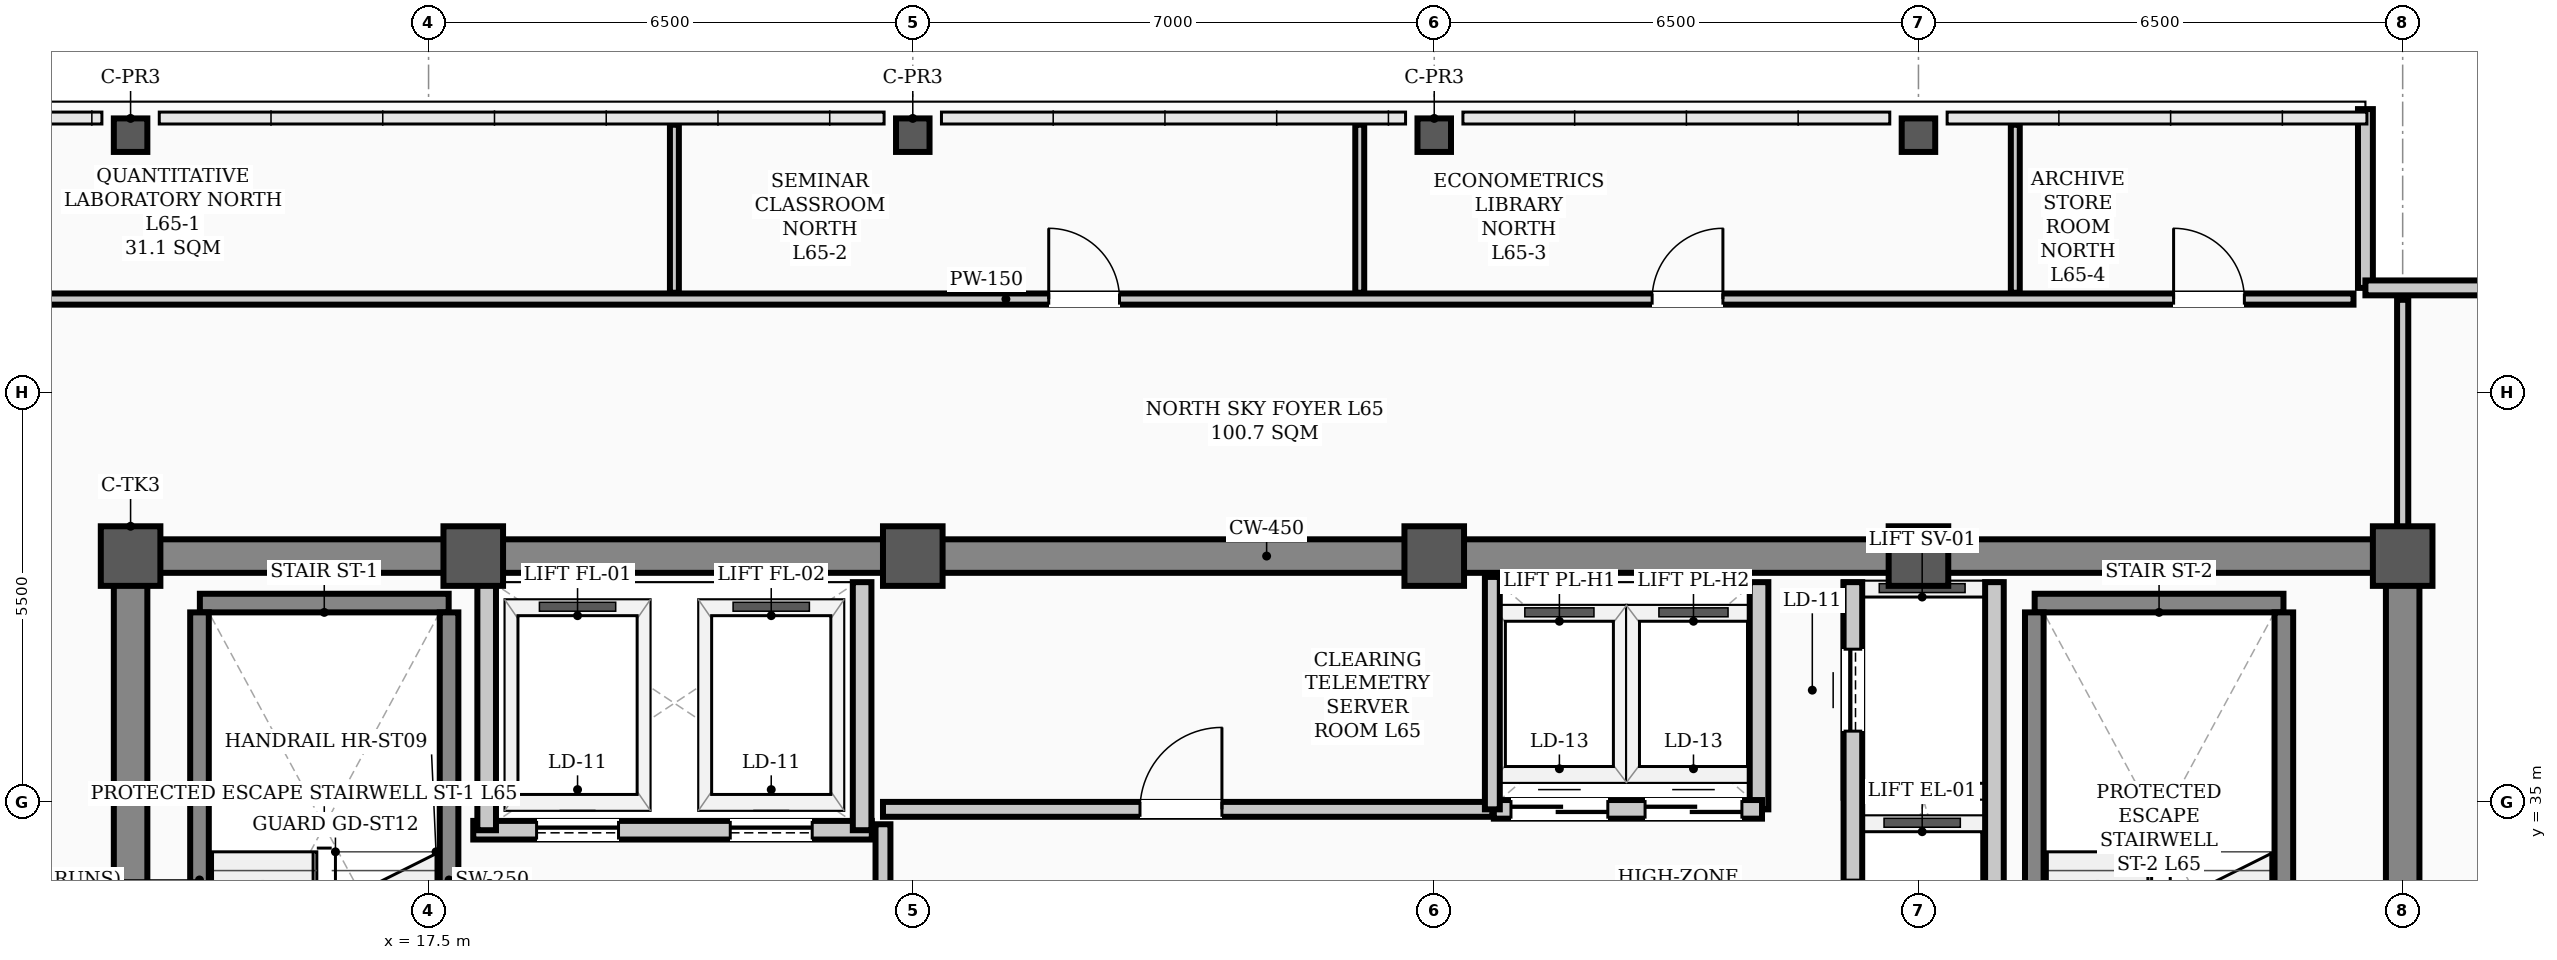
"""IFC4 building model, lengths in metres.
Left out: names, types, materials, properties, quantities, classifications, styles, units other than length and angle.
Written with IfcOpenShell. Run it as: python <this file> out.ifc"""

import sys

from ifc_helpers import new_model, si_unit, direction, frame, frame_2d, origin, origin_2d, place, context, subcontext, project, spatial, rectangle, hollow_rectangle, extrude, element, fill, save


model = new_model("IFC4")
c1 = context("Model", 3, precision=1e-05, world=origin(), true_north=direction((0.0, 1.0)))
c2 = subcontext(c1, "Body", "Model", "MODEL_VIEW")
j1 = project(units=[si_unit("LENGTHUNIT", "METRE"), si_unit("PLANEANGLEUNIT", "RADIAN")], contexts=[c1])
p1 = place(None, origin())
s1 = spatial("IfcSite", under=j1, at=p1, CompositionType="ELEMENT")
p2 = place(p1, origin())
s2 = spatial("IfcBuilding", under=s1, at=p2, CompositionType="ELEMENT")
p3 = place(p2, frame((0.0, 0.0, 261.8)))
s3 = spatial("IfcBuildingStorey", under=s2, at=p3, CompositionType="ELEMENT", Elevation=261.8)
for number, where, z_axis, x_axis in (
    (1, (13.5, 38.3, 0.0), (0.0, 0.0, 1.0), (1.0, 0.0, 0.0)),
    (2, (18.1, 38.3, 0.0), (0.0, 0.0, 1.0), (1.0, 0.0, 0.0)),
    (3, (24.0, 38.3, 0.0), (0.0, 0.0, 1.0), (1.0, 0.0, 0.0)),
    (4, (31.0, 38.3, 0.0), (0.0, 0.0, 1.0), (1.0, 0.0, 0.0)),
    (5, (37.5, 38.3, 0.0), (0.0, 0.0, 1.0), (1.0, 0.0, 0.0)),
    (6, (44.0, 38.3, 0.0), (0.0, 0.0, 1.0), (1.0, 0.0, 0.0)),
):
    element("IfcColumn", number, at=place(p3, frame(where, z_axis=z_axis, x_axis=x_axis)), inside=s3, PredefinedType="COLUMN", context=c2, shape_type="SweptSolid", body=[
        extrude(hollow_rectangle(XDim=0.8, YDim=0.8, WallThickness=0.032, InnerFilletRadius=0.016, OuterFilletRadius=0.048, at=origin_2d()), origin(), (0.0, 0.0, 1.0), 3.9),
    ])
for number, where, z_axis, x_axis in (
    (7, (13.5, 43.95, 0.0), (0.0, 0.0, 1.0), (1.0, 0.0, 0.0)),
    (8, (24.0, 43.95, 0.0), (0.0, 0.0, 1.0), (1.0, 0.0, 0.0)),
    (9, (31.0, 43.95, 0.0), (0.0, 0.0, 1.0), (1.0, 0.0, 0.0)),
    (10, (37.5, 43.95, 0.0), (0.0, 0.0, 1.0), (1.0, 0.0, 0.0)),
):
    element("IfcColumn", number, at=place(p3, frame(where, z_axis=z_axis, x_axis=x_axis)), inside=s3, PredefinedType="COLUMN", context=c2, shape_type="SweptSolid", body=[
        extrude(hollow_rectangle(XDim=0.45, YDim=0.45, WallThickness=0.022, InnerFilletRadius=0.022, OuterFilletRadius=0.044, at=origin_2d()), origin(), (0.0, 0.0, 1.0), 3.9),
    ])
p4 = place(p3, frame((43.5, 44.3, 0.0), z_axis=(0.0, 0.0, 1.0), x_axis=(0.0, -1.0, 0.0)))
e11 = element("IfcWall", 11, at=p4, inside=s3, PredefinedType="PARAPET", context=c2, shape_type="SweptSolid", body=[
    extrude(rectangle(XDim=2.4, YDim=0.2, at=frame_2d((1.2, 0.0))), origin(), (0.0, 0.0, 1.0), 1.2),
])
p5 = place(p3, frame((43.5, 41.9, 0.0), z_axis=(0.0, 0.0, 1.0), x_axis=(1.0, 0.0, 0.0)))
e12 = element("IfcWall", 12, at=p5, inside=s3, PredefinedType="PARAPET", context=c2, shape_type="SweptSolid", body=[
    extrude(rectangle(XDim=2.4, YDim=0.2, at=frame_2d((1.2, 0.0))), origin(), (0.0, 0.0, 1.0), 1.2),
])
p6 = place(p3, frame((13.5, 38.3, 0.0), z_axis=(0.0, 0.0, 1.0), x_axis=(1.0, 0.0, 0.0)))
e13 = element("IfcWall", 13, at=p6, inside=s3, PredefinedType="SHEAR", context=c2, shape_type="SweptSolid", body=[
    extrude(rectangle(XDim=30.5, YDim=0.45, at=frame_2d((15.25, 0.0))), origin(), (0.0, 0.0, 1.0), 3.72),
])
for number, where, z_axis, x_axis in (
    (14, (13.5, 29.35, 0.0), (0.0, 0.0, 1.0), (0.0, 1.0, 0.0)),
    (15, (44.0, 29.35, 0.0), (0.0, 0.0, 1.0), (0.0, 1.0, 0.0)),
):
    element("IfcWall", number, at=place(p3, frame(where, z_axis=z_axis, x_axis=x_axis)), inside=s3, PredefinedType="SHEAR", context=c2, shape_type="SweptSolid", body=[
        extrude(rectangle(XDim=8.6, YDim=0.45, at=frame_2d((4.3, 0.0))), origin(), (0.0, 0.0, 1.0), 3.72),
    ])
p7 = place(p3, frame((14.43, 37.669, 0.0), z_axis=(0.0, 0.0, 1.0), x_axis=(1.0, 0.0, 0.0)))
e16 = element("IfcWall", 16, at=p7, inside=s3, PredefinedType="STANDARD", context=c2, shape_type="SweptSolid", body=[
    extrude(rectangle(XDim=3.34, YDim=0.25, at=frame_2d((1.67, 0.0))), origin(), (0.0, 0.0, 1.0), 3.72),
])
for number, where, z_axis, x_axis in (
    (17, (14.425, 30.36, 0.0), (0.0, 0.0, 1.0), (0.0, 1.0, 0.0)),
    (18, (17.775, 30.36, 0.0), (0.0, 0.0, 1.0), (0.0, 1.0, 0.0)),
):
    element("IfcWall", number, at=place(p3, frame(where, z_axis=z_axis, x_axis=x_axis)), inside=s3, PredefinedType="STANDARD", context=c2, shape_type="SweptSolid", body=[
        extrude(rectangle(XDim=7.184, YDim=0.25, at=frame_2d((3.592, 0.0))), origin(), (0.0, 0.0, 1.0), 3.72),
    ])
p8 = place(p3, frame((39.06, 37.669, 0.0), z_axis=(0.0, 0.0, 1.0), x_axis=(1.0, 0.0, 0.0)))
e19 = element("IfcWall", 19, at=p8, inside=s3, PredefinedType="STANDARD", context=c2, shape_type="SweptSolid", body=[
    extrude(rectangle(XDim=3.34, YDim=0.25, at=frame_2d((1.67, 0.0))), origin(), (0.0, 0.0, 1.0), 3.72),
])
for number, where, z_axis, x_axis in (
    (20, (39.055, 30.36, 0.0), (0.0, 0.0, 1.0), (0.0, 1.0, 0.0)),
    (21, (42.405, 30.36, 0.0), (0.0, 0.0, 1.0), (0.0, 1.0, 0.0)),
):
    element("IfcWall", number, at=place(p3, frame(where, z_axis=z_axis, x_axis=x_axis)), inside=s3, PredefinedType="STANDARD", context=c2, shape_type="SweptSolid", body=[
        extrude(rectangle(XDim=7.184, YDim=0.25, at=frame_2d((3.592, 0.0))), origin(), (0.0, 0.0, 1.0), 3.72),
    ])
p9 = place(p3, frame((18.1, 34.62, 0.0), z_axis=(0.0, 0.0, 1.0), x_axis=(1.0, 0.0, 0.0)))
e22 = element("IfcWall", 22, at=p9, inside=s3, PredefinedType="STANDARD", context=c2, shape_type="SweptSolid", body=[
    extrude(rectangle(XDim=5.35, YDim=0.25, at=frame_2d((2.675, 0.0))), origin(), (0.0, 0.0, 1.0), 3.72),
])
p10 = place(p9, frame((0.85, 0.0, 0.0)))
e23 = element("IfcOpeningElement", 23, at=p10, cuts=e22, PredefinedType="OPENING", context=c2, shape_type="SweptSolid", body=[
    extrude(rectangle(XDim=1.1, YDim=2.08, at=frame_2d((0.55, 1.04))), frame((0.0, 0.135, 0.0), z_axis=(0.0, -1.0, 0.0), x_axis=(1.0, 0.0, 0.0)), (0.0, 0.0, 1.0), 0.27),
])
p11 = place(p9, frame((3.45, 0.0, 0.0)))
e24 = element("IfcOpeningElement", 24, at=p11, cuts=e22, PredefinedType="OPENING", context=c2, shape_type="SweptSolid", body=[
    extrude(rectangle(XDim=1.1, YDim=2.08, at=frame_2d((0.55, 1.04))), frame((0.0, 0.135, 0.0), z_axis=(0.0, -1.0, 0.0), x_axis=(1.0, 0.0, 0.0)), (0.0, 0.0, 1.0), 0.27),
])
p12 = place(p3, frame((36.62, 31.95, 0.0), z_axis=(0.0, 0.0, 1.0), x_axis=(0.0, 1.0, 0.0)))
e25 = element("IfcWall", 25, at=p12, inside=s3, PredefinedType="STANDARD", context=c2, shape_type="SweptSolid", body=[
    extrude(rectangle(XDim=6.0, YDim=0.25, at=frame_2d((3.0, 0.0))), origin(), (0.0, 0.0, 1.0), 3.4),
])
p13 = place(p12, frame((0.9, 0.0, 0.0)))
e26 = element("IfcOpeningElement", 26, at=p13, cuts=e25, PredefinedType="OPENING", context=c2, shape_type="SweptSolid", body=[
    extrude(rectangle(XDim=1.1, YDim=2.08, at=frame_2d((0.55, 1.04))), frame((0.0, 0.135, 0.0), z_axis=(0.0, -1.0, 0.0), x_axis=(1.0, 0.0, 0.0)), (0.0, 0.0, 1.0), 0.27),
])
p14 = place(p12, frame((4.0, 0.0, 0.0)))
e27 = element("IfcOpeningElement", 27, at=p14, cuts=e25, PredefinedType="OPENING", context=c2, shape_type="SweptSolid", body=[
    extrude(rectangle(XDim=1.1, YDim=2.08, at=frame_2d((0.55, 1.04))), frame((0.0, 0.135, 0.0), z_axis=(0.0, -1.0, 0.0), x_axis=(1.0, 0.0, 0.0)), (0.0, 0.0, 1.0), 0.27),
])
p15 = place(p3, frame((38.52, 31.95, 0.0), z_axis=(0.0, 0.0, 1.0), x_axis=(0.0, 1.0, 0.0)))
e28 = element("IfcWall", 28, at=p15, inside=s3, PredefinedType="STANDARD", context=c2, shape_type="SweptSolid", body=[
    extrude(rectangle(XDim=6.0, YDim=0.25, at=frame_2d((3.0, 0.0))), origin(), (0.0, 0.0, 1.0), 3.48),
])
for number, where, z_axis, x_axis in (
    (29, (18.28, 34.62, 0.0), (0.0, 0.0, 1.0), (0.0, 1.0, 0.0)),
    (30, (23.32, 34.62, 0.0), (0.0, 0.0, 1.0), (0.0, 1.0, 0.0)),
):
    element("IfcWall", number, at=place(p3, frame(where, z_axis=z_axis, x_axis=x_axis)), inside=s3, PredefinedType="STANDARD", context=c2, shape_type="SweptSolid", body=[
        extrude(rectangle(XDim=3.33, YDim=0.25, at=frame_2d((1.665, 0.0))), origin(), (0.0, 0.0, 1.0), 3.4),
    ])
p16 = place(p3, frame((35.36, 34.9, 0.0), z_axis=(0.0, 0.0, 1.0), x_axis=(0.0, 1.0, 0.0)))
e31 = element("IfcWall", 31, at=p16, inside=s3, PredefinedType="STANDARD", context=c2, shape_type="SweptSolid", body=[
    extrude(rectangle(XDim=3.05, YDim=0.25, at=frame_2d((1.525, 0.0))), origin(), (0.0, 0.0, 1.0), 3.4),
])
p17 = place(p3, frame((31.8, 34.9, 0.0), z_axis=(0.0, 0.0, 1.0), x_axis=(1.0, 0.0, 0.0)))
e32 = element("IfcWall", 32, at=p17, inside=s3, PredefinedType="STANDARD", context=c2, shape_type="SweptSolid", body=[
    extrude(rectangle(XDim=3.6, YDim=0.25, at=frame_2d((1.8, 0.0))), origin(), (0.0, 0.0, 1.0), 3.72),
])
p18 = place(p17, frame((0.23, 0.0, 0.0)))
e33 = element("IfcOpeningElement", 33, at=p18, cuts=e32, PredefinedType="OPENING", context=c2, shape_type="SweptSolid", body=[
    extrude(rectangle(XDim=1.3, YDim=2.08, at=frame_2d((0.65, 1.04))), frame((0.0, 0.135, 0.0), z_axis=(0.0, -1.0, 0.0), x_axis=(1.0, 0.0, 0.0)), (0.0, 0.0, 1.0), 0.27),
])
p19 = place(p17, frame((2.03, 0.0, 0.0)))
e34 = element("IfcOpeningElement", 34, at=p19, cuts=e32, PredefinedType="OPENING", context=c2, shape_type="SweptSolid", body=[
    extrude(rectangle(XDim=1.3, YDim=2.08, at=frame_2d((0.65, 1.04))), frame((0.0, 0.135, 0.0), z_axis=(0.0, -1.0, 0.0), x_axis=(1.0, 0.0, 0.0)), (0.0, 0.0, 1.0), 0.27),
])
p20 = place(p3, frame((23.6, 34.9, 0.0), z_axis=(0.0, 0.0, 1.0), x_axis=(1.0, 0.0, 0.0)))
e35 = element("IfcWall", 35, at=p20, inside=s3, PredefinedType="STANDARD", context=c2, shape_type="SweptSolid", body=[
    extrude(rectangle(XDim=8.18, YDim=0.2, at=frame_2d((4.09, 0.0))), origin(), (0.0, 0.0, 1.0), 3.72),
])
p21 = place(p20, frame((3.45, 0.0, 0.0)))
e36 = element("IfcOpeningElement", 36, at=p21, cuts=e35, PredefinedType="OPENING", context=c2, shape_type="SweptSolid", body=[
    extrude(rectangle(XDim=1.1, YDim=2.08, at=frame_2d((0.55, 1.04))), frame((0.0, 0.11, 0.0), z_axis=(0.0, -1.0, 0.0), x_axis=(1.0, 0.0, 0.0)), (0.0, 0.0, 1.0), 0.22),
])
p22 = place(p3, frame((7.16, 41.75, 0.0), z_axis=(0.0, 0.0, 1.0), x_axis=(1.0, 0.0, 0.0)))
e37 = element("IfcWall", 37, at=p22, inside=s3, PredefinedType="PARTITIONING", context=c2, shape_type="SweptSolid", body=[
    extrude(rectangle(XDim=36.18, YDim=0.15, at=frame_2d((18.09, 0.0))), origin(), (0.0, 0.0, 1.0), 3.2),
])
p23 = place(p22, frame((3.855, 0.0, 0.0)))
e38 = element("IfcOpeningElement", 38, at=p23, cuts=e37, PredefinedType="OPENING", context=c2, shape_type="SweptSolid", body=[
    extrude(rectangle(XDim=0.95, YDim=2.08, at=frame_2d((0.475, 1.04))), frame((0.0, 0.085, 0.0), z_axis=(0.0, -1.0, 0.0), x_axis=(1.0, 0.0, 0.0)), (0.0, 0.0, 1.0), 0.17),
])
p24 = place(p22, frame((18.665, 0.0, 0.0)))
e39 = element("IfcOpeningElement", 39, at=p24, cuts=e37, PredefinedType="OPENING", context=c2, shape_type="SweptSolid", body=[
    extrude(rectangle(XDim=0.95, YDim=2.08, at=frame_2d((0.475, 1.04))), frame((0.0, 0.085, 0.0), z_axis=(0.0, -1.0, 0.0), x_axis=(1.0, 0.0, 0.0)), (0.0, 0.0, 1.0), 0.17),
])
p25 = place(p22, frame((26.765, 0.0, 0.0)))
e40 = element("IfcOpeningElement", 40, at=p25, cuts=e37, PredefinedType="OPENING", context=c2, shape_type="SweptSolid", body=[
    extrude(rectangle(XDim=0.95, YDim=2.08, at=frame_2d((0.475, 1.04))), frame((0.0, 0.085, 0.0), z_axis=(0.0, -1.0, 0.0), x_axis=(1.0, 0.0, 0.0)), (0.0, 0.0, 1.0), 0.17),
])
p26 = place(p22, frame((33.765, 0.0, 0.0)))
e41 = element("IfcOpeningElement", 41, at=p26, cuts=e37, PredefinedType="OPENING", context=c2, shape_type="SweptSolid", body=[
    extrude(rectangle(XDim=0.95, YDim=2.08, at=frame_2d((0.475, 1.04))), frame((0.0, 0.085, 0.0), z_axis=(0.0, -1.0, 0.0), x_axis=(1.0, 0.0, 0.0)), (0.0, 0.0, 1.0), 0.17),
])
p27 = place(p3, frame((23.6, 29.235, 0.0), z_axis=(0.0, 0.0, 1.0), x_axis=(0.0, 1.0, 0.0)))
e42 = element("IfcWall", 42, at=p27, inside=s3, PredefinedType="STANDARD", context=c2, shape_type="SweptSolid", body=[
    extrude(rectangle(XDim=5.465, YDim=0.2, at=frame_2d((2.732, 0.0))), origin(), (0.0, 0.0, 1.0), 3.2),
])
p28 = place(p3, frame((44.0, 38.535, 0.0), z_axis=(0.0, 0.0, 1.0), x_axis=(0.0, 1.0, 0.0)))
e43 = element("IfcWall", 43, at=p28, inside=s3, PredefinedType="PARTITIONING", context=c2, shape_type="SweptSolid", body=[
    extrude(rectangle(XDim=3.205, YDim=0.15, at=frame_2d((1.603, 0.0))), origin(), (0.0, 0.0, 1.0), 3.72),
])
for number, where, z_axis, x_axis in (
    (44, (20.8, 41.835, 0.0), (0.0, 0.0, 1.0), (0.0, 1.0, 0.0)),
    (45, (30.0, 41.835, 0.0), (0.0, 0.0, 1.0), (0.0, 1.0, 0.0)),
):
    element("IfcWall", number, at=place(p3, frame(where, z_axis=z_axis, x_axis=x_axis)), inside=s3, PredefinedType="PARTITIONING", context=c2, shape_type="SweptSolid", body=[
        extrude(rectangle(XDim=2.255, YDim=0.12, at=frame_2d((1.127, 0.0))), origin(), (0.0, 0.0, 1.0), 3.212),
    ])
p29 = place(p3, frame((38.8, 41.835, 0.0), z_axis=(0.0, 0.0, 1.0), x_axis=(0.0, 1.0, 0.0)))
e46 = element("IfcWall", 46, at=p29, inside=s3, PredefinedType="PARTITIONING", context=c2, shape_type="SweptSolid", body=[
    extrude(rectangle(XDim=2.255, YDim=0.12, at=frame_2d((1.127, 0.0))), origin(), (0.0, 0.0, 1.0), 3.72),
])
p30 = place(p3, frame((31.78, 34.9, 0.0), z_axis=(0.0, 0.0, 1.0), x_axis=(0.0, 1.0, 0.0)))
e47 = element("IfcWall", 47, at=p30, inside=s3, PredefinedType="STANDARD", context=c2, shape_type="SweptSolid", body=[
    extrude(rectangle(XDim=3.12, YDim=0.2, at=frame_2d((1.56, 0.0))), origin(), (0.0, 0.0, 1.0), 3.4),
])
p31 = place(p21, origin())
e48 = element("IfcDoor", 48, at=p31, inside=s3, OperationType="SINGLE_SWING_RIGHT", PredefinedType="DOOR", context=c2, shape_type="SweptSolid", body=[
    extrude(rectangle(XDim=1.1, YDim=2.08, at=frame_2d((0.55, 1.04))), frame((0.0, 0.025, 0.0), z_axis=(0.0, -1.0, 0.0), x_axis=(1.0, 0.0, 0.0)), (0.0, 0.0, 1.0), 0.05),
])
fill(e36, e48)
p32 = place(p24, origin())
e49 = element("IfcDoor", 49, at=p32, inside=s3, OperationType="SINGLE_SWING_LEFT", PredefinedType="DOOR", context=c2, shape_type="SweptSolid", body=[
    extrude(rectangle(XDim=0.95, YDim=2.08, at=frame_2d((0.475, 1.04))), frame((0.0, 0.025, 0.0), z_axis=(0.0, -1.0, 0.0), x_axis=(1.0, 0.0, 0.0)), (0.0, 0.0, 1.0), 0.05),
])
fill(e39, e49)
p33 = place(p25, origin())
e50 = element("IfcDoor", 50, at=p33, inside=s3, OperationType="SINGLE_SWING_RIGHT", PredefinedType="DOOR", context=c2, shape_type="SweptSolid", body=[
    extrude(rectangle(XDim=0.95, YDim=2.08, at=frame_2d((0.475, 1.04))), frame((0.0, 0.025, 0.0), z_axis=(0.0, -1.0, 0.0), x_axis=(1.0, 0.0, 0.0)), (0.0, 0.0, 1.0), 0.05),
])
fill(e40, e50)
p34 = place(p26, origin())
e51 = element("IfcDoor", 51, at=p34, inside=s3, OperationType="SINGLE_SWING_LEFT", PredefinedType="DOOR", context=c2, shape_type="SweptSolid", body=[
    extrude(rectangle(XDim=0.95, YDim=2.08, at=frame_2d((0.475, 1.04))), frame((0.0, 0.025, 0.0), z_axis=(0.0, -1.0, 0.0), x_axis=(1.0, 0.0, 0.0)), (0.0, 0.0, 1.0), 0.05),
])
fill(e41, e51)
p35 = place(p10, origin())
e52 = element("IfcDoor", 52, at=p35, inside=s3, OperationType="SLIDING_TO_LEFT", PredefinedType="DOOR", context=c2, shape_type="SweptSolid", body=[
    extrude(rectangle(XDim=1.1, YDim=2.08, at=frame_2d((0.55, 1.04))), frame((0.0, 0.025, 0.0), z_axis=(0.0, -1.0, 0.0), x_axis=(1.0, 0.0, 0.0)), (0.0, 0.0, 1.0), 0.05),
])
fill(e23, e52)
p36 = place(p11, origin())
e53 = element("IfcDoor", 53, at=p36, inside=s3, OperationType="SLIDING_TO_LEFT", PredefinedType="DOOR", context=c2, shape_type="SweptSolid", body=[
    extrude(rectangle(XDim=1.1, YDim=2.08, at=frame_2d((0.55, 1.04))), frame((0.0, 0.025, 0.0), z_axis=(0.0, -1.0, 0.0), x_axis=(1.0, 0.0, 0.0)), (0.0, 0.0, 1.0), 0.05),
])
fill(e24, e53)
p37 = place(p14, origin())
e54 = element("IfcDoor", 54, at=p37, inside=s3, OperationType="SLIDING_TO_LEFT", PredefinedType="DOOR", context=c2, shape_type="SweptSolid", body=[
    extrude(rectangle(XDim=1.1, YDim=2.08, at=frame_2d((0.55, 1.04))), frame((0.0, 0.025, 0.0), z_axis=(0.0, -1.0, 0.0), x_axis=(1.0, 0.0, 0.0)), (0.0, 0.0, 1.0), 0.05),
])
fill(e27, e54)
p38 = place(p18, origin())
e55 = element("IfcDoor", 55, at=p38, inside=s3, OperationType="DOUBLE_DOOR_SLIDING", PredefinedType="DOOR", context=c2, shape_type="SweptSolid", body=[
    extrude(rectangle(XDim=1.3, YDim=2.08, at=frame_2d((0.65, 1.04))), frame((0.0, 0.025, 0.0), z_axis=(0.0, -1.0, 0.0), x_axis=(1.0, 0.0, 0.0)), (0.0, 0.0, 1.0), 0.05),
])
fill(e33, e55)
p39 = place(p19, origin())
e56 = element("IfcDoor", 56, at=p39, inside=s3, OperationType="DOUBLE_DOOR_SLIDING", PredefinedType="DOOR", context=c2, shape_type="SweptSolid", body=[
    extrude(rectangle(XDim=1.3, YDim=2.08, at=frame_2d((0.65, 1.04))), frame((0.0, 0.025, 0.0), z_axis=(0.0, -1.0, 0.0), x_axis=(1.0, 0.0, 0.0)), (0.0, 0.0, 1.0), 0.05),
])
fill(e34, e56)
save(model, sys.argv[1])
